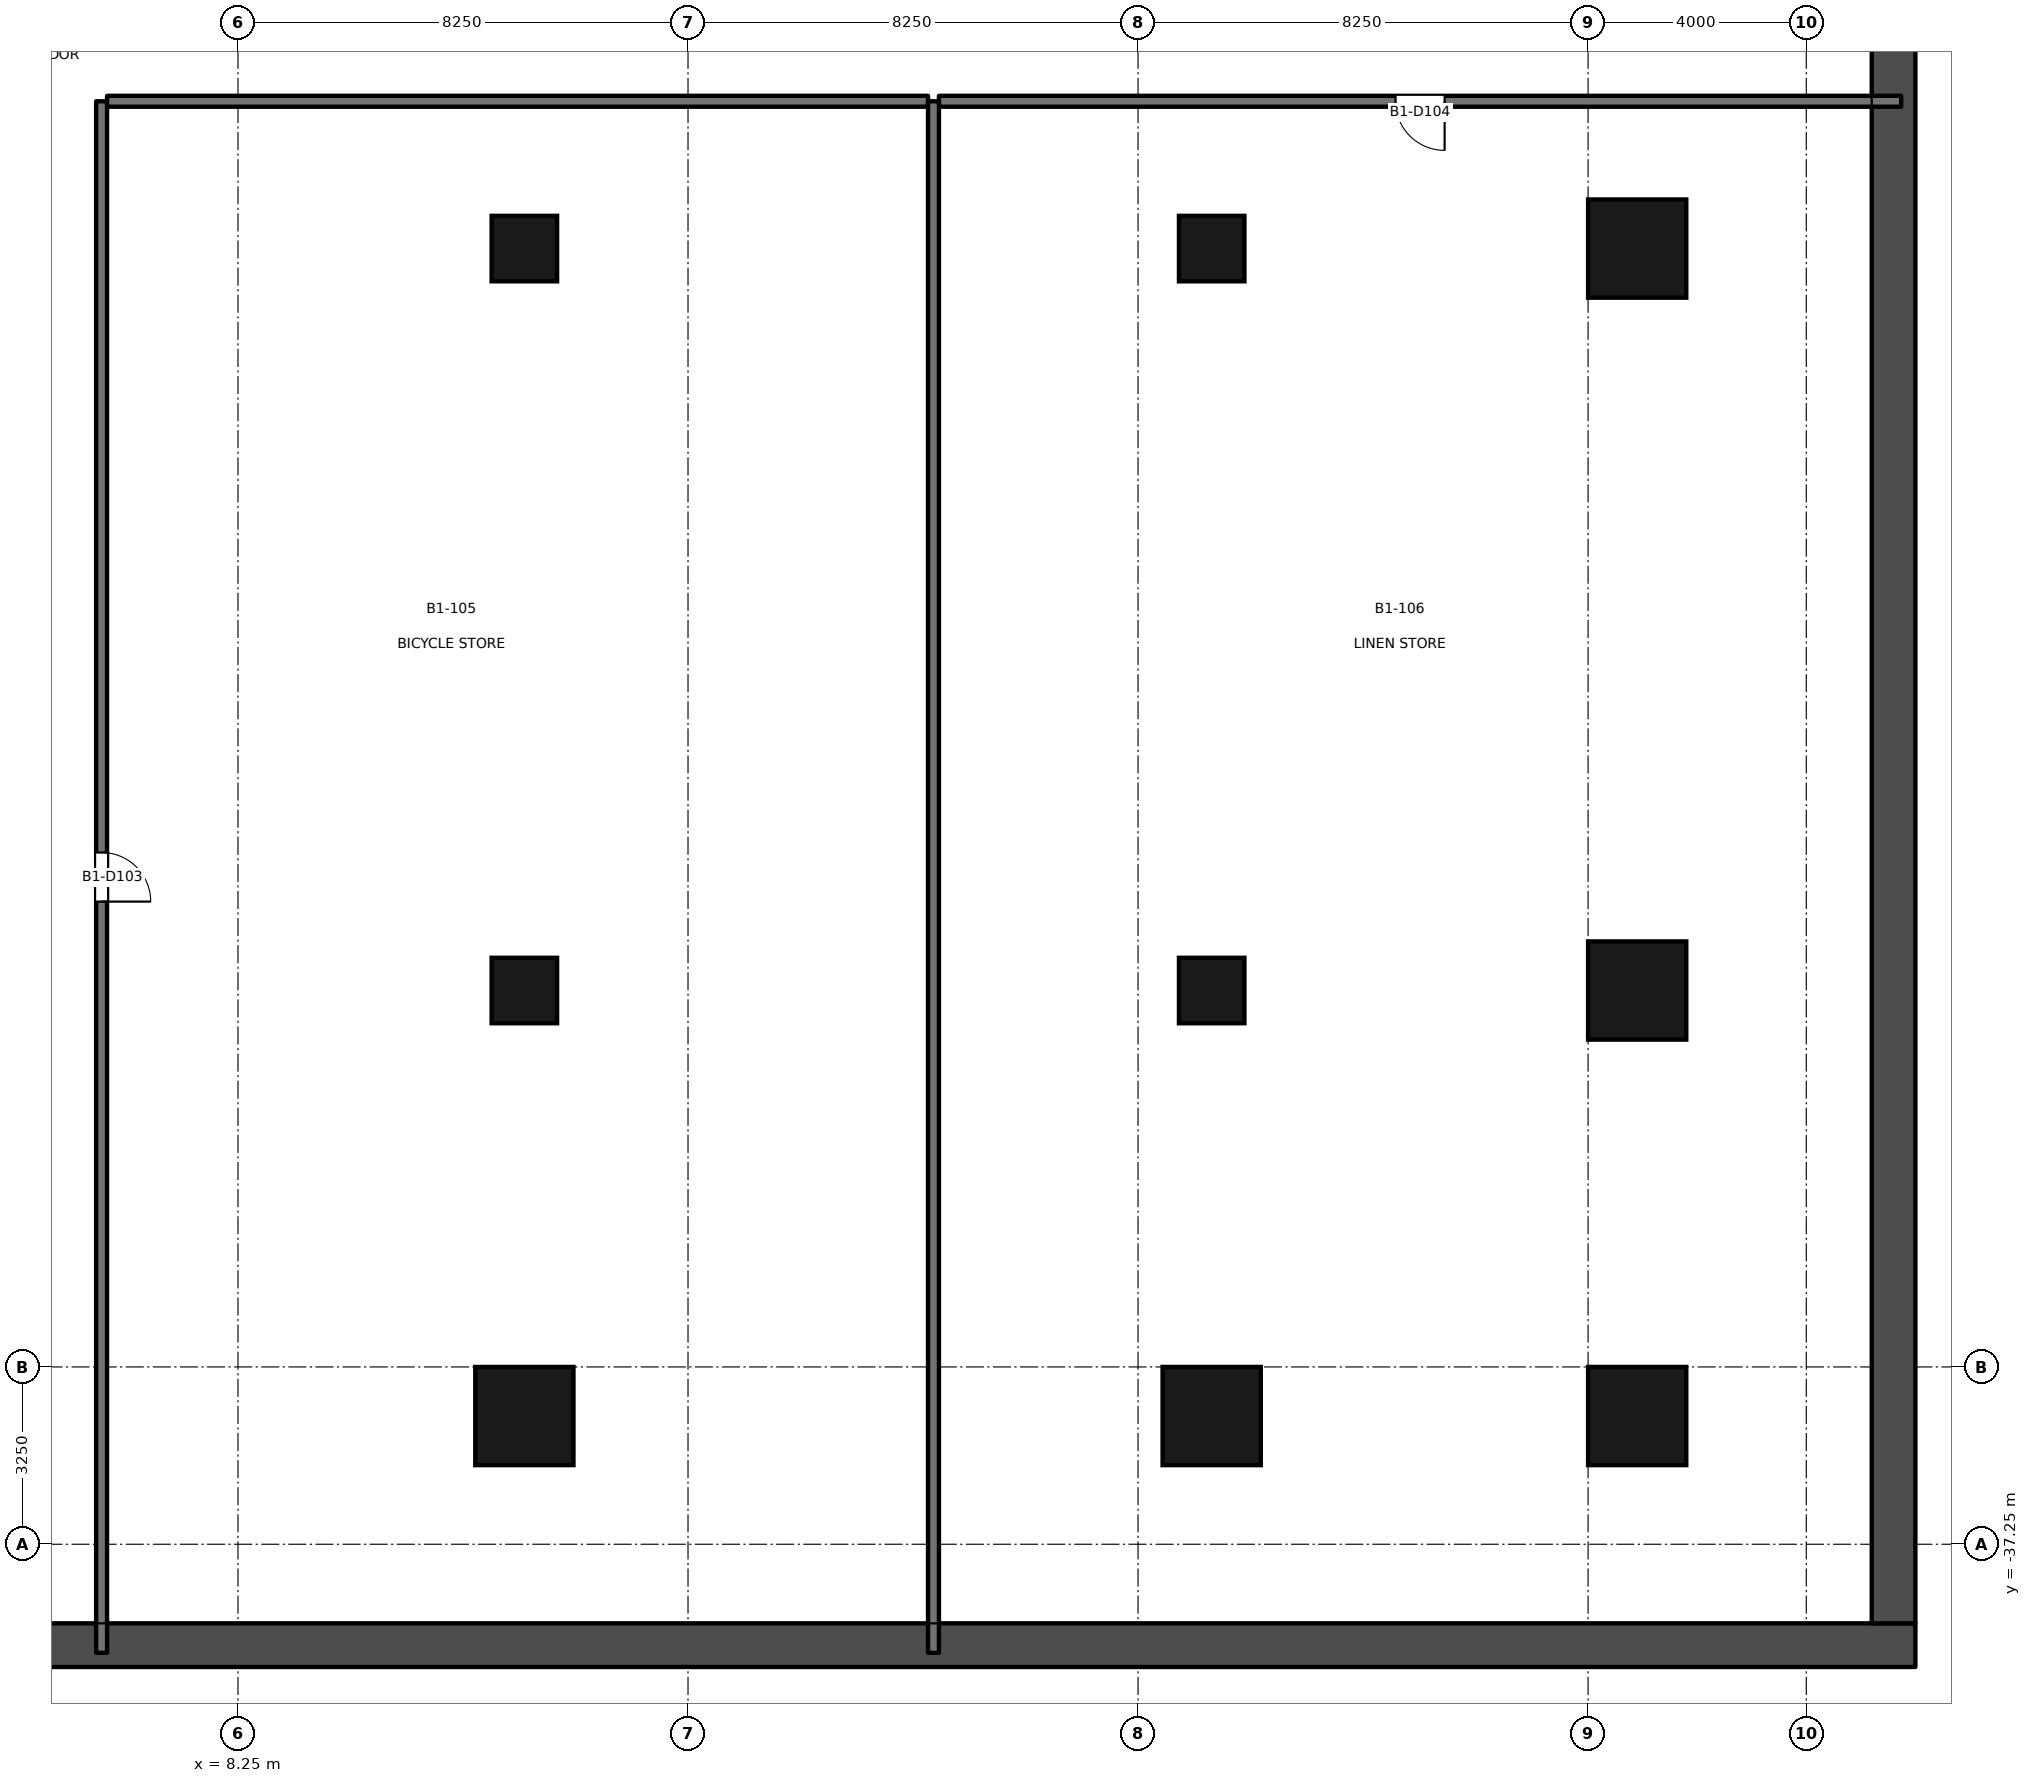
"""IFC4 building model, lengths in metres.
Left out: names, types, materials, properties, quantities, classifications, styles, units other than length and angle.
Written with IfcOpenShell. Run it as: python <this file> out.ifc"""

import sys

from ifc_helpers import new_model, si_unit, direction, frame, frame_2d, origin, origin_2d, place, context, subcontext, project, spatial, rectangle, extrude, element, fill, save


model = new_model("IFC4")
c1 = context("Model", 3, precision=1e-05, world=origin(), true_north=direction((0.0, 1.0)))
c2 = subcontext(c1, "Body", "Model", "MODEL_VIEW")
j1 = project(units=[si_unit("LENGTHUNIT", "METRE"), si_unit("PLANEANGLEUNIT", "RADIAN")], contexts=[c1])
p1 = place(None, origin())
s1 = spatial("IfcSite", under=j1, at=p1, CompositionType="ELEMENT")
p2 = place(p1, origin())
s2 = spatial("IfcBuilding", under=s1, at=p2, CompositionType="ELEMENT")
p3 = place(p2, frame((0.0, 0.0, -5.5)))
s3 = spatial("IfcBuildingStorey", under=s2, at=p3, CompositionType="ELEMENT", Elevation=-5.5)
p4 = place(p3, frame((-39.0, -39.1, -0.2), z_axis=(0.0, 0.0, 1.0), x_axis=(1.0, 0.0, 0.0)))
e1 = element("IfcWall", 1, at=p4, inside=s3, PredefinedType="SOLIDWALL", context=c2, shape_type="SweptSolid", body=[
    extrude(rectangle(XDim=78.0, YDim=0.8, at=frame_2d((39.0, 0.0))), origin(), (0.0, 0.0, 1.0), 5.5),
])
p5 = place(p3, frame((38.6, -38.7, -0.2), z_axis=(0.0, 0.0, 1.0), x_axis=(0.0, 1.0, 0.0)))
e2 = element("IfcWall", 2, at=p5, inside=s3, PredefinedType="SOLIDWALL", context=c2, shape_type="SweptSolid", body=[
    extrude(rectangle(XDim=51.9, YDim=0.8, at=frame_2d((25.95, 0.0))), origin(), (0.0, 0.0, 1.0), 5.5),
])
for number, where, z_axis, x_axis in (
    (3, (33.9, -34.9, -0.2), (0.0, 0.0, 1.0), (1.0, 0.0, 0.0)),
    (4, (13.5, -34.9, -0.2), (0.0, 0.0, 1.0), (1.0, 0.0, 0.0)),
    (5, (26.1, -34.9, -0.2), (0.0, 0.0, 1.0), (1.0, 0.0, 0.0)),
    (6, (33.9, -27.1, -0.2), (0.0, 0.0, 1.0), (0.0, 1.0, 0.0)),
    (7, (33.9, -13.5, -0.2), (0.0, 0.0, 1.0), (0.0, 1.0, 0.0)),
):
    element("IfcColumn", number, at=place(p3, frame(where, z_axis=z_axis, x_axis=x_axis)), inside=s3, PredefinedType="COLUMN", context=c2, shape_type="SweptSolid", body=[
        extrude(rectangle(XDim=1.8, YDim=1.8, at=origin_2d()), origin(), (0.0, 0.0, 1.0), 5.5),
    ])
for number, where, z_axis, x_axis in (
    (8, (13.5, -27.1, -0.2), (0.0, 0.0, 1.0), (1.0, 0.0, 0.0)),
    (9, (26.1, -27.1, -0.2), (0.0, 0.0, 1.0), (1.0, 0.0, 0.0)),
    (10, (13.5, -13.5, -0.2), (0.0, 0.0, 1.0), (1.0, 0.0, 0.0)),
    (11, (26.1, -13.5, -0.2), (0.0, 0.0, 1.0), (1.0, 0.0, 0.0)),
):
    element("IfcColumn", number, at=place(p3, frame(where, z_axis=z_axis, x_axis=x_axis)), inside=s3, PredefinedType="COLUMN", context=c2, shape_type="SweptSolid", body=[
        extrude(rectangle(XDim=1.2, YDim=1.2, at=origin_2d()), origin(), (0.0, 0.0, 1.0), 5.5),
    ])
p6 = place(p3, frame((5.75, -10.8, 0.0), z_axis=(0.0, 0.0, 1.0), x_axis=(0.0, -1.0, 0.0)))
e12 = element("IfcWall", 12, at=p6, inside=s3, PredefinedType="PARTITIONING", context=c2, shape_type="SweptSolid", body=[
    extrude(rectangle(XDim=28.44, YDim=0.2, at=frame_2d((14.22, 0.0))), origin(), (0.0, 0.0, 1.0), 4.3),
])
p7 = place(p6, frame((13.77, 0.0, 0.0)))
e13 = element("IfcOpeningElement", 13, at=p7, cuts=e12, PredefinedType="OPENING", context=c2, shape_type="SweptSolid", body=[
    extrude(rectangle(XDim=0.9, YDim=2.1, at=frame_2d((0.45, 1.05))), frame((0.0, 0.111, 0.0), z_axis=(0.0, -1.0, 0.0), x_axis=(1.0, 0.0, 0.0)), (0.0, 0.0, 1.0), 0.221),
])
p8 = place(p3, frame((20.9, -10.8, 0.0), z_axis=(0.0, 0.0, 1.0), x_axis=(-1.0, 0.0, 0.0)))
e14 = element("IfcWall", 14, at=p8, inside=s3, PredefinedType="PARTITIONING", context=c2, shape_type="SweptSolid", body=[
    extrude(rectangle(XDim=15.05, YDim=0.2, at=frame_2d((7.525, 0.0))), origin(), (0.0, 0.0, 1.0), 3.9),
])
p9 = place(p3, frame((38.74, -10.8, 0.0), z_axis=(0.0, 0.0, 1.0), x_axis=(-1.0, 0.0, 0.0)))
e15 = element("IfcWall", 15, at=p9, inside=s3, PredefinedType="PARTITIONING", context=c2, shape_type="SweptSolid", body=[
    extrude(rectangle(XDim=17.64, YDim=0.2, at=frame_2d((8.82, 0.0))), origin(), (0.0, 0.0, 1.0), 4.1),
])
p10 = place(p9, frame((8.37, 0.0, 0.0)))
e16 = element("IfcOpeningElement", 16, at=p10, cuts=e15, PredefinedType="OPENING", context=c2, shape_type="SweptSolid", body=[
    extrude(rectangle(XDim=0.9, YDim=2.1, at=frame_2d((0.45, 1.05))), frame((0.0, 0.111, 0.0), z_axis=(0.0, -1.0, 0.0), x_axis=(1.0, 0.0, 0.0)), (0.0, 0.0, 1.0), 0.221),
])
p11 = place(p3, frame((21.0, -10.8, 0.0), z_axis=(0.0, 0.0, 1.0), x_axis=(0.0, -1.0, 0.0)))
e17 = element("IfcWall", 17, at=p11, inside=s3, PredefinedType="PARTITIONING", context=c2, shape_type="SweptSolid", body=[
    extrude(rectangle(XDim=28.44, YDim=0.2, at=frame_2d((14.22, 0.0))), origin(), (0.0, 0.0, 1.0), 4.3),
])
p12 = place(p7, origin())
e18 = element("IfcDoor", 18, at=p12, inside=s3, OperationType="SINGLE_SWING_RIGHT", PredefinedType="DOOR", context=c2, shape_type="SweptSolid", body=[
    extrude(rectangle(XDim=0.9, YDim=2.1, at=frame_2d((0.45, 1.05))), frame((0.0, 0.025, 0.0), z_axis=(0.0, -1.0, 0.0), x_axis=(1.0, 0.0, 0.0)), (0.0, 0.0, 1.0), 0.05),
])
fill(e13, e18)
p13 = place(p10, origin())
e19 = element("IfcDoor", 19, at=p13, inside=s3, OperationType="SINGLE_SWING_LEFT", PredefinedType="DOOR", context=c2, shape_type="SweptSolid", body=[
    extrude(rectangle(XDim=0.9, YDim=2.1, at=frame_2d((0.45, 1.05))), frame((0.0, 0.025, 0.0), z_axis=(0.0, -1.0, 0.0), x_axis=(1.0, 0.0, 0.0)), (0.0, 0.0, 1.0), 0.05),
])
fill(e16, e19)
save(model, sys.argv[1])
